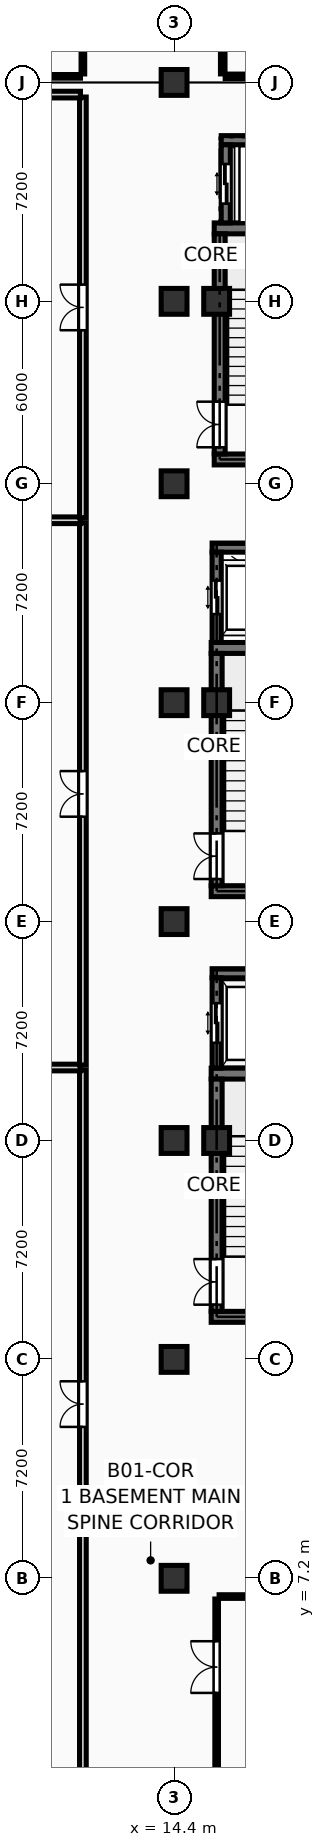
"""IFC4 building model, lengths in metres.
Left out: names, types, materials, properties, quantities, classifications, styles, units other than length and angle.
Written with IfcOpenShell. Run it as: python <this file> out.ifc"""

import sys

from ifc_helpers import new_model, si_unit, direction, frame, frame_2d, origin, origin_2d, place, context, subcontext, project, spatial, rectangle, extrude, element, fill, save


model = new_model("IFC4")
c1 = context("Model", 3, precision=1e-05, world=origin(), true_north=direction((0.0, 1.0)))
c2 = subcontext(c1, "Body", "Model", "MODEL_VIEW")
j1 = project(units=[si_unit("LENGTHUNIT", "METRE"), si_unit("PLANEANGLEUNIT", "RADIAN")], contexts=[c1])
p1 = place(None, origin())
s1 = spatial("IfcSite", under=j1, at=p1, CompositionType="ELEMENT")
p2 = place(p1, origin())
s2 = spatial("IfcBuilding", under=s1, at=p2, CompositionType="ELEMENT")
p3 = place(p2, frame((0.0, 0.0, -4.5)))
s3 = spatial("IfcBuildingStorey", under=s2, at=p3, CompositionType="ELEMENT", Elevation=-4.5)
p4 = place(p3, frame((14.4, 7.2, -0.3), z_axis=(0.0, 0.0, 1.0), x_axis=(1.0, 0.0, 0.0)))
e1 = element("IfcColumn", 1, at=p4, inside=s3, PredefinedType="COLUMN", context=c2, shape_type="SweptSolid", body=[
    extrude(rectangle(XDim=0.85, YDim=0.85, at=origin_2d()), origin(), (0.0, 0.0, 1.0), 4.8),
])
for number, where, z_axis, x_axis in (
    (2, (14.4, 14.4, 0.0), (0.0, 0.0, 1.0), (1.0, 0.0, 0.0)),
    (3, (14.4, 21.6, 0.0), (0.0, 0.0, 1.0), (1.0, 0.0, 0.0)),
    (4, (14.4, 28.8, 0.0), (0.0, 0.0, 1.0), (1.0, 0.0, 0.0)),
    (5, (14.4, 36.0, 0.0), (0.0, 0.0, 1.0), (1.0, 0.0, 0.0)),
    (6, (14.4, 43.2, 0.0), (0.0, 0.0, 1.0), (1.0, 0.0, 0.0)),
    (7, (14.4, 49.2, 0.0), (0.0, 0.0, 1.0), (1.0, 0.0, 0.0)),
    (8, (14.4, 56.4, 0.0), (0.0, 0.0, 1.0), (1.0, 0.0, 0.0)),
    (9, (15.8, 21.6, 0.0), (0.0, 0.0, 1.0), (1.0, 0.0, 0.0)),
    (10, (15.8, 36.0, 0.0), (0.0, 0.0, 1.0), (1.0, 0.0, 0.0)),
    (11, (15.8, 49.2, 0.0), (0.0, 0.0, 1.0), (1.0, 0.0, 0.0)),
):
    element("IfcColumn", number, at=place(p3, frame(where, z_axis=z_axis, x_axis=x_axis)), inside=s3, PredefinedType="COLUMN", context=c2, shape_type="SweptSolid", body=[
        extrude(rectangle(XDim=0.85, YDim=0.85, at=origin_2d()), origin(), (0.0, 0.0, 1.0), 4.5),
    ])
for number, where, z_axis, x_axis in (
    (12, (15.62, 15.8, -0.3), (0.0, 0.0, 1.0), (1.0, 0.0, 0.0)),
    (13, (15.62, 23.8, -0.3), (0.0, 0.0, 1.0), (1.0, 0.0, 0.0)),
):
    element("IfcWall", number, at=place(p3, frame(where, z_axis=z_axis, x_axis=x_axis)), inside=s3, PredefinedType="SHEAR", context=c2, shape_type="SweptSolid", body=[
        extrude(rectangle(XDim=4.88, YDim=0.36, at=frame_2d((2.44, 0.0))), origin(), (0.0, 0.0, 1.0), 4.54),
    ])
p5 = place(p3, frame((15.8, 15.98, -0.3), z_axis=(0.0, 0.0, 1.0), x_axis=(0.0, 1.0, 0.0)))
e14 = element("IfcWall", 14, at=p5, inside=s3, PredefinedType="SHEAR", context=c2, shape_type="SweptSolid", body=[
    extrude(rectangle(XDim=7.64, YDim=0.36, at=frame_2d((3.82, 0.0))), origin(), (0.0, 0.0, 1.0), 4.54),
])
p6 = place(p5, frame((0.22, 0.0, 0.3)))
e15 = element("IfcOpeningElement", 15, at=p6, cuts=e14, PredefinedType="OPENING", context=c2, shape_type="SweptSolid", body=[
    extrude(rectangle(XDim=1.5, YDim=2.2, at=frame_2d((0.75, 1.1))), frame((0.0, 0.192, 0.0), z_axis=(0.0, -1.0, 0.0), x_axis=(1.0, 0.0, 0.0)), (0.0, 0.0, 1.0), 0.384),
])
for number, where, z_axis, x_axis in (
    (16, (15.62, 29.8, -0.3), (0.0, 0.0, 1.0), (1.0, 0.0, 0.0)),
    (17, (15.62, 37.8, -0.3), (0.0, 0.0, 1.0), (1.0, 0.0, 0.0)),
):
    element("IfcWall", number, at=place(p3, frame(where, z_axis=z_axis, x_axis=x_axis)), inside=s3, PredefinedType="SHEAR", context=c2, shape_type="SweptSolid", body=[
        extrude(rectangle(XDim=4.88, YDim=0.36, at=frame_2d((2.44, 0.0))), origin(), (0.0, 0.0, 1.0), 4.54),
    ])
p7 = place(p3, frame((15.8, 29.98, -0.3), z_axis=(0.0, 0.0, 1.0), x_axis=(0.0, 1.0, 0.0)))
e18 = element("IfcWall", 18, at=p7, inside=s3, PredefinedType="SHEAR", context=c2, shape_type="SweptSolid", body=[
    extrude(rectangle(XDim=7.64, YDim=0.36, at=frame_2d((3.82, 0.0))), origin(), (0.0, 0.0, 1.0), 4.54),
])
p8 = place(p7, frame((0.22, 0.0, 0.3)))
e19 = element("IfcOpeningElement", 19, at=p8, cuts=e18, PredefinedType="OPENING", context=c2, shape_type="SweptSolid", body=[
    extrude(rectangle(XDim=1.5, YDim=2.2, at=frame_2d((0.75, 1.1))), frame((0.0, 0.192, 0.0), z_axis=(0.0, -1.0, 0.0), x_axis=(1.0, 0.0, 0.0)), (0.0, 0.0, 1.0), 0.384),
])
for number, where, z_axis, x_axis in (
    (20, (15.72, 44.0, -0.3), (0.0, 0.0, 1.0), (1.0, 0.0, 0.0)),
    (21, (15.72, 51.6, -0.3), (0.0, 0.0, 1.0), (1.0, 0.0, 0.0)),
):
    element("IfcWall", number, at=place(p3, frame(where, z_axis=z_axis, x_axis=x_axis)), inside=s3, PredefinedType="SHEAR", context=c2, shape_type="SweptSolid", body=[
        extrude(rectangle(XDim=4.48, YDim=0.36, at=frame_2d((2.24, 0.0))), origin(), (0.0, 0.0, 1.0), 4.54),
    ])
p9 = place(p3, frame((15.9, 44.18, -0.3), z_axis=(0.0, 0.0, 1.0), x_axis=(0.0, 1.0, 0.0)))
e22 = element("IfcWall", 22, at=p9, inside=s3, PredefinedType="SHEAR", context=c2, shape_type="SweptSolid", body=[
    extrude(rectangle(XDim=7.24, YDim=0.36, at=frame_2d((3.62, 0.0))), origin(), (0.0, 0.0, 1.0), 4.54),
])
p10 = place(p9, frame((0.22, 0.0, 0.3)))
e23 = element("IfcOpeningElement", 23, at=p10, cuts=e22, PredefinedType="OPENING", context=c2, shape_type="SweptSolid", body=[
    extrude(rectangle(XDim=1.5, YDim=2.2, at=frame_2d((0.75, 1.1))), frame((0.0, 0.192, 0.0), z_axis=(0.0, -1.0, 0.0), x_axis=(1.0, 0.0, 0.0)), (0.0, 0.0, 1.0), 0.384),
])
p11 = place(p3, frame((15.65, 27.1, -1.6), z_axis=(0.0, 0.0, 1.0), x_axis=(1.0, 0.0, 0.0)))
e24 = element("IfcWall", 24, at=p11, inside=s3, PredefinedType="SHEAR", context=c2, shape_type="SweptSolid", body=[
    extrude(rectangle(XDim=2.56, YDim=0.3, at=frame_2d((1.28, 0.0))), origin(), (0.0, 0.0, 1.0), 5.84),
])
p12 = place(p3, frame((15.8, 23.98, -1.6), z_axis=(0.0, 0.0, 1.0), x_axis=(0.0, 1.0, 0.0)))
e25 = element("IfcWall", 25, at=p12, inside=s3, PredefinedType="SHEAR", context=c2, shape_type="SweptSolid", body=[
    extrude(rectangle(XDim=2.97, YDim=0.3, at=frame_2d((1.485, 0.0))), origin(), (0.0, 0.0, 1.0), 5.84),
])
p13 = place(p12, frame((0.835, 0.0, 1.6)))
e26 = element("IfcOpeningElement", 26, at=p13, cuts=e25, PredefinedType="OPENING", context=c2, shape_type="SweptSolid", body=[
    extrude(rectangle(XDim=1.3, YDim=2.25, at=frame_2d((0.65, 1.125))), frame((0.0, 0.162, 0.0), z_axis=(0.0, -1.0, 0.0), x_axis=(1.0, 0.0, 0.0)), (0.0, 0.0, 1.0), 0.324),
])
p14 = place(p3, frame((15.65, 41.1, -1.6), z_axis=(0.0, 0.0, 1.0), x_axis=(1.0, 0.0, 0.0)))
e27 = element("IfcWall", 27, at=p14, inside=s3, PredefinedType="SHEAR", context=c2, shape_type="SweptSolid", body=[
    extrude(rectangle(XDim=2.56, YDim=0.3, at=frame_2d((1.28, 0.0))), origin(), (0.0, 0.0, 1.0), 5.84),
])
p15 = place(p3, frame((15.8, 37.98, -1.6), z_axis=(0.0, 0.0, 1.0), x_axis=(0.0, 1.0, 0.0)))
e28 = element("IfcWall", 28, at=p15, inside=s3, PredefinedType="SHEAR", context=c2, shape_type="SweptSolid", body=[
    extrude(rectangle(XDim=2.97, YDim=0.3, at=frame_2d((1.485, 0.0))), origin(), (0.0, 0.0, 1.0), 5.84),
])
p16 = place(p15, frame((0.935, 0.0, 1.6)))
e29 = element("IfcOpeningElement", 29, at=p16, cuts=e28, PredefinedType="OPENING", context=c2, shape_type="SweptSolid", body=[
    extrude(rectangle(XDim=1.1, YDim=2.2, at=frame_2d((0.55, 1.1))), frame((0.0, 0.162, 0.0), z_axis=(0.0, -1.0, 0.0), x_axis=(1.0, 0.0, 0.0)), (0.0, 0.0, 1.0), 0.324),
])
p17 = place(p3, frame((15.95, 54.5, -1.6), z_axis=(0.0, 0.0, 1.0), x_axis=(1.0, 0.0, 0.0)))
e30 = element("IfcWall", 30, at=p17, inside=s3, PredefinedType="SHEAR", context=c2, shape_type="SweptSolid", body=[
    extrude(rectangle(XDim=3.0, YDim=0.3, at=frame_2d((1.5, 0.0))), origin(), (0.0, 0.0, 1.0), 5.84),
])
p18 = place(p3, frame((16.1, 51.78, -1.6), z_axis=(0.0, 0.0, 1.0), x_axis=(0.0, 1.0, 0.0)))
e31 = element("IfcWall", 31, at=p18, inside=s3, PredefinedType="SHEAR", context=c2, shape_type="SweptSolid", body=[
    extrude(rectangle(XDim=2.57, YDim=0.3, at=frame_2d((1.285, 0.0))), origin(), (0.0, 0.0, 1.0), 5.84),
])
p19 = place(p18, frame((0.635, 0.0, 1.6)))
e32 = element("IfcOpeningElement", 32, at=p19, cuts=e31, PredefinedType="OPENING", context=c2, shape_type="SweptSolid", body=[
    extrude(rectangle(XDim=1.3, YDim=2.25, at=frame_2d((0.65, 1.125))), frame((0.0, 0.162, 0.0), z_axis=(0.0, -1.0, 0.0), x_axis=(1.0, 0.0, 0.0)), (0.0, 0.0, 1.0), 0.324),
])
p20 = place(p3, frame((11.4, 0.58, 0.0), z_axis=(0.0, 0.0, 1.0), x_axis=(0.0, 1.0, 0.0)))
e33 = element("IfcWall", 33, at=p20, inside=s3, PredefinedType="PARTITIONING", context=c2, shape_type="SweptSolid", body=[
    extrude(rectangle(XDim=23.34, YDim=0.22, at=frame_2d((11.67, 0.0))), origin(), (0.0, 0.0, 1.0), 4.225),
])
p21 = place(p20, frame((11.6, 0.0, 0.0)))
e34 = element("IfcOpeningElement", 34, at=p21, cuts=e33, PredefinedType="OPENING", context=c2, shape_type="SweptSolid", body=[
    extrude(rectangle(XDim=1.5, YDim=2.25, at=frame_2d((0.75, 1.125))), frame((0.0, 0.122, 0.0), z_axis=(0.0, -1.0, 0.0), x_axis=(1.0, 0.0, 0.0)), (0.0, 0.0, 1.0), 0.244),
])
p22 = place(p3, frame((0.58, 24.0, 0.0), z_axis=(0.0, 0.0, 1.0), x_axis=(1.0, 0.0, 0.0)))
e35 = element("IfcWall", 35, at=p22, inside=s3, PredefinedType="PARTITIONING", context=c2, shape_type="SweptSolid", body=[
    extrude(rectangle(XDim=10.74, YDim=0.22, at=frame_2d((5.37, 0.0))), origin(), (0.0, 0.0, 1.0), 4.225),
])
p23 = place(p3, frame((11.4, 24.08, 0.0), z_axis=(0.0, 0.0, 1.0), x_axis=(0.0, 1.0, 0.0)))
e36 = element("IfcWall", 36, at=p23, inside=s3, PredefinedType="PARTITIONING", context=c2, shape_type="SweptSolid", body=[
    extrude(rectangle(XDim=17.84, YDim=0.22, at=frame_2d((8.92, 0.0))), origin(), (0.0, 0.0, 1.0), 4.225),
])
p24 = place(p23, frame((8.17, 0.0, 0.0)))
e37 = element("IfcOpeningElement", 37, at=p24, cuts=e36, PredefinedType="OPENING", context=c2, shape_type="SweptSolid", body=[
    extrude(rectangle(XDim=1.5, YDim=2.25, at=frame_2d((0.75, 1.125))), frame((0.0, 0.122, 0.0), z_axis=(0.0, -1.0, 0.0), x_axis=(1.0, 0.0, 0.0)), (0.0, 0.0, 1.0), 0.244),
])
p25 = place(p3, frame((0.58, 42.0, 0.0), z_axis=(0.0, 0.0, 1.0), x_axis=(1.0, 0.0, 0.0)))
e38 = element("IfcWall", 38, at=p25, inside=s3, PredefinedType="PARTITIONING", context=c2, shape_type="SweptSolid", body=[
    extrude(rectangle(XDim=10.74, YDim=0.22, at=frame_2d((5.37, 0.0))), origin(), (0.0, 0.0, 1.0), 4.225),
])
p26 = place(p3, frame((11.4, 42.08, 0.0), z_axis=(0.0, 0.0, 1.0), x_axis=(0.0, 1.0, 0.0)))
e39 = element("IfcWall", 39, at=p26, inside=s3, PredefinedType="PARTITIONING", context=c2, shape_type="SweptSolid", body=[
    extrude(rectangle(XDim=13.84, YDim=0.22, at=frame_2d((6.92, 0.0))), origin(), (0.0, 0.0, 1.0), 4.225),
])
p27 = place(p26, frame((6.17, 0.0, 0.0)))
e40 = element("IfcOpeningElement", 40, at=p27, cuts=e39, PredefinedType="OPENING", context=c2, shape_type="SweptSolid", body=[
    extrude(rectangle(XDim=1.5, YDim=2.25, at=frame_2d((0.75, 1.125))), frame((0.0, 0.122, 0.0), z_axis=(0.0, -1.0, 0.0), x_axis=(1.0, 0.0, 0.0)), (0.0, 0.0, 1.0), 0.244),
])
p28 = place(p3, frame((0.58, 56.0, 0.0), z_axis=(0.0, 0.0, 1.0), x_axis=(1.0, 0.0, 0.0)))
e41 = element("IfcWall", 41, at=p28, inside=s3, PredefinedType="PARTITIONING", context=c2, shape_type="SweptSolid", body=[
    extrude(rectangle(XDim=10.74, YDim=0.22, at=frame_2d((5.37, 0.0))), origin(), (0.0, 0.0, 1.0), 3.375),
])
p29 = place(p3, frame((15.8, 0.58, 0.0), z_axis=(0.0, 0.0, 1.0), x_axis=(0.0, 1.0, 0.0)))
e42 = element("IfcWall", 42, at=p29, inside=s3, PredefinedType="PARTITIONING", context=c2, shape_type="SweptSolid", body=[
    extrude(rectangle(XDim=5.94, YDim=0.12, at=frame_2d((2.97, 0.0))), origin(), (0.0, 0.0, 1.0), 4.225),
])
p30 = place(p29, frame((2.851, 0.0, 0.0)))
e43 = element("IfcOpeningElement", 43, at=p30, cuts=e42, PredefinedType="OPENING", context=c2, shape_type="SweptSolid", body=[
    extrude(rectangle(XDim=1.7, YDim=2.28, at=frame_2d((0.85, 1.14))), frame((0.0, 0.072, 0.0), z_axis=(0.0, -1.0, 0.0), x_axis=(1.0, 0.0, 0.0)), (0.0, 0.0, 1.0), 0.144),
])
p31 = place(p3, frame((15.88, 6.6, 0.0), z_axis=(0.0, 0.0, 1.0), x_axis=(1.0, 0.0, 0.0)))
e44 = element("IfcWall", 44, at=p31, inside=s3, PredefinedType="PARTITIONING", context=c2, shape_type="SweptSolid", body=[
    extrude(rectangle(XDim=48.44, YDim=0.12, at=frame_2d((24.22, 0.0))), origin(), (0.0, 0.0, 1.0), 4.225),
])
p32 = place(p3, frame((0.58, 56.6, 0.0), z_axis=(0.0, 0.0, 1.0), x_axis=(1.0, 0.0, 0.0)))
e45 = element("IfcWall", 45, at=p32, inside=s3, PredefinedType="PARTITIONING", context=c2, shape_type="SweptSolid", body=[
    extrude(rectangle(XDim=10.74, YDim=0.12, at=frame_2d((5.37, 0.0))), origin(), (0.0, 0.0, 1.0), 3.375),
])
p33 = place(p3, frame((11.4, 56.68, 0.0), z_axis=(0.0, 0.0, 1.0), x_axis=(0.0, 1.0, 0.0)))
e46 = element("IfcWall", 46, at=p33, inside=s3, PredefinedType="PARTITIONING", context=c2, shape_type="SweptSolid", body=[
    extrude(rectangle(XDim=28.44, YDim=0.12, at=frame_2d((14.22, 0.0))), origin(), (0.0, 0.0, 1.0), 4.225),
])
p34 = place(p33, frame((13.37, 0.0, 0.0)))
e47 = element("IfcOpeningElement", 47, at=p34, cuts=e46, PredefinedType="OPENING", context=c2, shape_type="SweptSolid", body=[
    extrude(rectangle(XDim=1.7, YDim=2.28, at=frame_2d((0.85, 1.14))), frame((0.0, 0.072, 0.0), z_axis=(0.0, -1.0, 0.0), x_axis=(1.0, 0.0, 0.0)), (0.0, 0.0, 1.0), 0.144),
])
p35 = place(p3, frame((16.0, 56.68, 0.0), z_axis=(0.0, 0.0, 1.0), x_axis=(0.0, 1.0, 0.0)))
e48 = element("IfcWall", 48, at=p35, inside=s3, PredefinedType="PARTITIONING", context=c2, shape_type="SweptSolid", body=[
    extrude(rectangle(XDim=15.1, YDim=0.15, at=frame_2d((7.55, 0.0))), origin(), (0.0, 0.0, 1.0), 4.225),
])
p36 = place(p35, frame((8.445, 0.0, 0.0)))
e49 = element("IfcOpeningElement", 49, at=p36, cuts=e48, PredefinedType="OPENING", context=c2, shape_type="SweptSolid", body=[
    extrude(rectangle(XDim=1.5, YDim=2.2, at=frame_2d((0.75, 1.1))), frame((0.0, 0.087, 0.0), z_axis=(0.0, -1.0, 0.0), x_axis=(1.0, 0.0, 0.0)), (0.0, 0.0, 1.0), 0.174),
])
p37 = place(p3, frame((16.08, 56.6, 0.0), z_axis=(0.0, 0.0, 1.0), x_axis=(1.0, 0.0, 0.0)))
e50 = element("IfcWall", 50, at=p37, inside=s3, PredefinedType="PARTITIONING", context=c2, shape_type="SweptSolid", body=[
    extrude(rectangle(XDim=12.24, YDim=0.15, at=frame_2d((6.12, 0.0))), origin(), (0.0, 0.0, 1.0), 3.375),
])
p38 = place(p6, origin())
e51 = element("IfcDoor", 51, at=p38, inside=s3, OperationType="DOUBLE_DOOR_SINGLE_SWING", PredefinedType="DOOR", context=c2, shape_type="SweptSolid", body=[
    extrude(rectangle(XDim=1.5, YDim=2.2, at=frame_2d((0.75, 1.1))), frame((0.0, 0.025, 0.0), z_axis=(0.0, -1.0, 0.0), x_axis=(1.0, 0.0, 0.0)), (0.0, 0.0, 1.0), 0.05),
])
fill(e15, e51)
p39 = place(p8, origin())
e52 = element("IfcDoor", 52, at=p39, inside=s3, OperationType="DOUBLE_DOOR_SINGLE_SWING", PredefinedType="DOOR", context=c2, shape_type="SweptSolid", body=[
    extrude(rectangle(XDim=1.5, YDim=2.2, at=frame_2d((0.75, 1.1))), frame((0.0, 0.025, 0.0), z_axis=(0.0, -1.0, 0.0), x_axis=(1.0, 0.0, 0.0)), (0.0, 0.0, 1.0), 0.05),
])
fill(e19, e52)
p40 = place(p10, origin())
e53 = element("IfcDoor", 53, at=p40, inside=s3, OperationType="DOUBLE_DOOR_SINGLE_SWING", PredefinedType="DOOR", context=c2, shape_type="SweptSolid", body=[
    extrude(rectangle(XDim=1.5, YDim=2.2, at=frame_2d((0.75, 1.1))), frame((0.0, 0.025, 0.0), z_axis=(0.0, -1.0, 0.0), x_axis=(1.0, 0.0, 0.0)), (0.0, 0.0, 1.0), 0.05),
])
fill(e23, e53)
p41 = place(p13, origin())
e54 = element("IfcDoor", 54, at=p41, inside=s3, OperationType="DOUBLE_DOOR_SLIDING", PredefinedType="DOOR", context=c2, shape_type="SweptSolid", body=[
    extrude(rectangle(XDim=1.3, YDim=2.25, at=frame_2d((0.65, 1.125))), frame((0.0, 0.025, 0.0), z_axis=(0.0, -1.0, 0.0), x_axis=(1.0, 0.0, 0.0)), (0.0, 0.0, 1.0), 0.05),
])
fill(e26, e54)
p42 = place(p16, origin())
e55 = element("IfcDoor", 55, at=p42, inside=s3, OperationType="DOUBLE_DOOR_SLIDING", PredefinedType="DOOR", context=c2, shape_type="SweptSolid", body=[
    extrude(rectangle(XDim=1.1, YDim=2.2, at=frame_2d((0.55, 1.1))), frame((0.0, 0.025, 0.0), z_axis=(0.0, -1.0, 0.0), x_axis=(1.0, 0.0, 0.0)), (0.0, 0.0, 1.0), 0.05),
])
fill(e29, e55)
p43 = place(p19, origin())
e56 = element("IfcDoor", 56, at=p43, inside=s3, OperationType="DOUBLE_DOOR_SLIDING", PredefinedType="DOOR", context=c2, shape_type="SweptSolid", body=[
    extrude(rectangle(XDim=1.3, YDim=2.25, at=frame_2d((0.65, 1.125))), frame((0.0, 0.025, 0.0), z_axis=(0.0, -1.0, 0.0), x_axis=(1.0, 0.0, 0.0)), (0.0, 0.0, 1.0), 0.05),
])
fill(e32, e56)
p44 = place(p21, origin())
e57 = element("IfcDoor", 57, at=p44, inside=s3, OperationType="DOUBLE_DOOR_SINGLE_SWING", PredefinedType="DOOR", context=c2, shape_type="SweptSolid", body=[
    extrude(rectangle(XDim=1.5, YDim=2.25, at=frame_2d((0.75, 1.125))), frame((0.0, 0.025, 0.0), z_axis=(0.0, -1.0, 0.0), x_axis=(1.0, 0.0, 0.0)), (0.0, 0.0, 1.0), 0.05),
])
fill(e34, e57)
p45 = place(p24, origin())
e58 = element("IfcDoor", 58, at=p45, inside=s3, OperationType="DOUBLE_DOOR_SINGLE_SWING", PredefinedType="DOOR", context=c2, shape_type="SweptSolid", body=[
    extrude(rectangle(XDim=1.5, YDim=2.25, at=frame_2d((0.75, 1.125))), frame((0.0, 0.025, 0.0), z_axis=(0.0, -1.0, 0.0), x_axis=(1.0, 0.0, 0.0)), (0.0, 0.0, 1.0), 0.05),
])
fill(e37, e58)
p46 = place(p27, origin())
e59 = element("IfcDoor", 59, at=p46, inside=s3, OperationType="DOUBLE_DOOR_SINGLE_SWING", PredefinedType="DOOR", context=c2, shape_type="SweptSolid", body=[
    extrude(rectangle(XDim=1.5, YDim=2.25, at=frame_2d((0.75, 1.125))), frame((0.0, 0.025, 0.0), z_axis=(0.0, -1.0, 0.0), x_axis=(1.0, 0.0, 0.0)), (0.0, 0.0, 1.0), 0.05),
])
fill(e40, e59)
p47 = place(p30, origin())
e60 = element("IfcDoor", 60, at=p47, inside=s3, OperationType="DOUBLE_DOOR_SINGLE_SWING", PredefinedType="DOOR", context=c2, shape_type="SweptSolid", body=[
    extrude(rectangle(XDim=1.7, YDim=2.28, at=frame_2d((0.85, 1.14))), frame((0.0, 0.025, 0.0), z_axis=(0.0, -1.0, 0.0), x_axis=(1.0, 0.0, 0.0)), (0.0, 0.0, 1.0), 0.05),
])
fill(e43, e60)
save(model, sys.argv[1])
